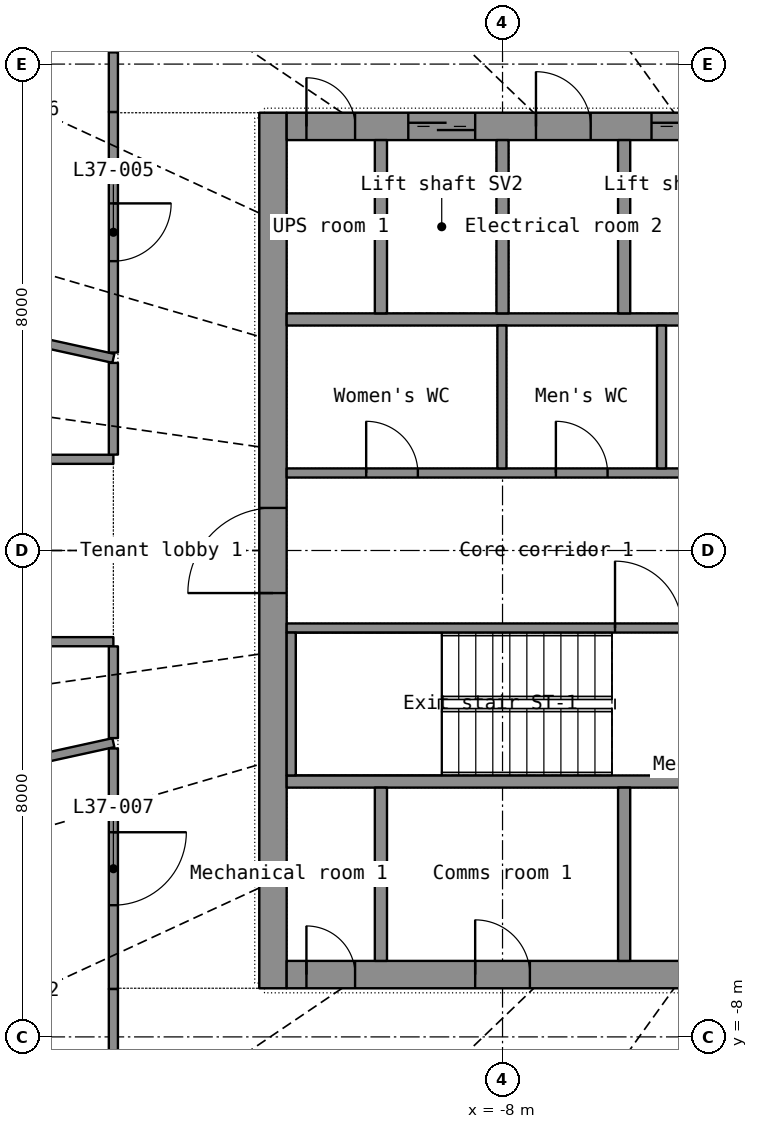
"""IFC4 building model, lengths in metres.
Left out: names, types, materials, properties, quantities, classifications, styles, units other than length and angle.
Written with IfcOpenShell. Run it as: python <this file> out.ifc"""

import sys

from ifc_helpers import new_model, si_unit, direction, frame, frame_2d, origin, place, context, subcontext, project, spatial, rectangle, extrude, element, fill, save


model = new_model("IFC4")
c1 = context("Model", 3, precision=1e-05, world=origin(), true_north=direction((0.0, 1.0)))
c2 = subcontext(c1, "Body", "Model", "MODEL_VIEW")
j1 = project(units=[si_unit("LENGTHUNIT", "METRE"), si_unit("PLANEANGLEUNIT", "RADIAN")], contexts=[c1])
p1 = place(None, origin())
s1 = spatial("IfcSite", under=j1, at=p1, CompositionType="ELEMENT")
p2 = place(p1, origin())
s2 = spatial("IfcBuilding", under=s1, at=p2, CompositionType="ELEMENT")
p3 = place(p2, frame((0.0, 0.0, 157.1)))
s3 = spatial("IfcBuildingStorey", under=s2, at=p3, CompositionType="ELEMENT", Elevation=157.1)
p4 = place(p3, frame((-11.775, -7.2, 0.0), z_axis=(0.0, 0.0, 1.0), x_axis=(0.0, 1.0, 0.0)))
e1 = element("IfcWall", 1, at=p4, inside=s3, PredefinedType="SHEAR", context=c2, shape_type="SweptSolid", body=[
    extrude(rectangle(XDim=14.4, YDim=0.45, at=frame_2d((7.2, 0.0))), origin(), (0.0, 0.0, 1.0), 3.3),
])
p5 = place(p4, frame((6.5, 0.0, 0.0)))
e2 = element("IfcOpeningElement", 2, at=p5, cuts=e1, PredefinedType="OPENING", context=c2, shape_type="SweptSolid", body=[
    extrude(rectangle(XDim=1.4, YDim=2.2, at=frame_2d((0.7, 1.1))), frame((0.0, 0.235, 0.0), z_axis=(0.0, -1.0, 0.0), x_axis=(1.0, 0.0, 0.0)), (0.0, 0.0, 1.0), 0.47),
])
p6 = place(p3, frame((-11.55, -6.975, 0.0), z_axis=(0.0, 0.0, 1.0), x_axis=(1.0, 0.0, 0.0)))
e3 = element("IfcWall", 3, at=p6, inside=s3, PredefinedType="SHEAR", context=c2, shape_type="SweptSolid", body=[
    extrude(rectangle(XDim=23.1, YDim=0.45, at=frame_2d((11.55, 0.0))), origin(), (0.0, 0.0, 1.0), 3.3),
])
p7 = place(p6, frame((20.0, 0.0, 0.0)))
e4 = element("IfcOpeningElement", 4, at=p7, cuts=e3, PredefinedType="OPENING", context=c2, shape_type="SweptSolid", body=[
    extrude(rectangle(XDim=1.1, YDim=2.2, at=frame_2d((0.55, 1.1))), frame((0.0, 0.235, 0.0), z_axis=(0.0, -1.0, 0.0), x_axis=(1.0, 0.0, 0.0)), (0.0, 0.0, 1.0), 0.47),
])
p8 = place(p6, frame((3.1, 0.0, 0.0)))
e5 = element("IfcOpeningElement", 5, at=p8, cuts=e3, PredefinedType="OPENING", context=c2, shape_type="SweptSolid", body=[
    extrude(rectangle(XDim=0.9, YDim=2.1, at=frame_2d((0.45, 1.05))), frame((0.0, 0.235, 0.0), z_axis=(0.0, -1.0, 0.0), x_axis=(1.0, 0.0, 0.0)), (0.0, 0.0, 1.0), 0.47),
])
p9 = place(p6, frame((9.1, 0.0, 0.0)))
e6 = element("IfcOpeningElement", 6, at=p9, cuts=e3, PredefinedType="OPENING", context=c2, shape_type="SweptSolid", body=[
    extrude(rectangle(XDim=0.9, YDim=2.1, at=frame_2d((0.45, 1.05))), frame((0.0, 0.235, 0.0), z_axis=(0.0, -1.0, 0.0), x_axis=(1.0, 0.0, 0.0)), (0.0, 0.0, 1.0), 0.47),
])
p10 = place(p6, frame((16.1, 0.0, 0.0)))
e7 = element("IfcOpeningElement", 7, at=p10, cuts=e3, PredefinedType="OPENING", context=c2, shape_type="SweptSolid", body=[
    extrude(rectangle(XDim=0.9, YDim=2.1, at=frame_2d((0.45, 1.05))), frame((0.0, 0.235, 0.0), z_axis=(0.0, -1.0, 0.0), x_axis=(1.0, 0.0, 0.0)), (0.0, 0.0, 1.0), 0.47),
])
p11 = place(p6, frame((0.325, 0.0, 0.0)))
e8 = element("IfcOpeningElement", 8, at=p11, cuts=e3, PredefinedType="OPENING", context=c2, shape_type="SweptSolid", body=[
    extrude(rectangle(XDim=0.8, YDim=2.05, at=frame_2d((0.4, 1.025))), frame((0.0, 0.235, 0.0), z_axis=(0.0, -1.0, 0.0), x_axis=(1.0, 0.0, 0.0)), (0.0, 0.0, 1.0), 0.47),
])
p12 = place(p6, frame((21.975, 0.0, 0.0)))
e9 = element("IfcOpeningElement", 9, at=p12, cuts=e3, PredefinedType="OPENING", context=c2, shape_type="SweptSolid", body=[
    extrude(rectangle(XDim=0.8, YDim=2.05, at=frame_2d((0.4, 1.025))), frame((0.0, 0.235, 0.0), z_axis=(0.0, -1.0, 0.0), x_axis=(1.0, 0.0, 0.0)), (0.0, 0.0, 1.0), 0.47),
])
p13 = place(p3, frame((-11.55, 6.975, 0.0), z_axis=(0.0, 0.0, 1.0), x_axis=(1.0, 0.0, 0.0)))
e10 = element("IfcWall", 10, at=p13, inside=s3, PredefinedType="SHEAR", context=c2, shape_type="SweptSolid", body=[
    extrude(rectangle(XDim=23.1, YDim=0.45, at=frame_2d((11.55, 0.0))), origin(), (0.0, 0.0, 1.0), 3.3),
])
p14 = place(p13, frame((2.0, 0.0, 0.0)))
e11 = element("IfcOpeningElement", 11, at=p14, cuts=e10, PredefinedType="OPENING", context=c2, shape_type="SweptSolid", body=[
    extrude(rectangle(XDim=1.1, YDim=2.2, at=frame_2d((0.55, 1.1))), frame((0.0, 0.235, 0.0), z_axis=(0.0, -1.0, 0.0), x_axis=(1.0, 0.0, 0.0)), (0.0, 0.0, 1.0), 0.47),
])
p15 = place(p13, frame((6.0, 0.0, 0.0)))
e12 = element("IfcOpeningElement", 12, at=p15, cuts=e10, PredefinedType="OPENING", context=c2, shape_type="SweptSolid", body=[
    extrude(rectangle(XDim=1.1, YDim=2.2, at=frame_2d((0.55, 1.1))), frame((0.0, 0.235, 0.0), z_axis=(0.0, -1.0, 0.0), x_axis=(1.0, 0.0, 0.0)), (0.0, 0.0, 1.0), 0.47),
])
p16 = place(p13, frame((8.0, 0.0, 0.0)))
e13 = element("IfcOpeningElement", 13, at=p16, cuts=e10, PredefinedType="OPENING", context=c2, shape_type="SweptSolid", body=[
    extrude(rectangle(XDim=1.1, YDim=2.2, at=frame_2d((0.55, 1.1))), frame((0.0, 0.235, 0.0), z_axis=(0.0, -1.0, 0.0), x_axis=(1.0, 0.0, 0.0)), (0.0, 0.0, 1.0), 0.47),
])
p17 = place(p13, frame((10.0, 0.0, 0.0)))
e14 = element("IfcOpeningElement", 14, at=p17, cuts=e10, PredefinedType="OPENING", context=c2, shape_type="SweptSolid", body=[
    extrude(rectangle(XDim=1.1, YDim=2.2, at=frame_2d((0.55, 1.1))), frame((0.0, 0.235, 0.0), z_axis=(0.0, -1.0, 0.0), x_axis=(1.0, 0.0, 0.0)), (0.0, 0.0, 1.0), 0.47),
])
p18 = place(p13, frame((12.0, 0.0, 0.0)))
e15 = element("IfcOpeningElement", 15, at=p18, cuts=e10, PredefinedType="OPENING", context=c2, shape_type="SweptSolid", body=[
    extrude(rectangle(XDim=1.1, YDim=2.2, at=frame_2d((0.55, 1.1))), frame((0.0, 0.235, 0.0), z_axis=(0.0, -1.0, 0.0), x_axis=(1.0, 0.0, 0.0)), (0.0, 0.0, 1.0), 0.47),
])
p19 = place(p13, frame((14.0, 0.0, 0.0)))
e16 = element("IfcOpeningElement", 16, at=p19, cuts=e10, PredefinedType="OPENING", context=c2, shape_type="SweptSolid", body=[
    extrude(rectangle(XDim=1.1, YDim=2.2, at=frame_2d((0.55, 1.1))), frame((0.0, 0.235, 0.0), z_axis=(0.0, -1.0, 0.0), x_axis=(1.0, 0.0, 0.0)), (0.0, 0.0, 1.0), 0.47),
])
p20 = place(p13, frame((16.0, 0.0, 0.0)))
e17 = element("IfcOpeningElement", 17, at=p20, cuts=e10, PredefinedType="OPENING", context=c2, shape_type="SweptSolid", body=[
    extrude(rectangle(XDim=1.1, YDim=2.2, at=frame_2d((0.55, 1.1))), frame((0.0, 0.235, 0.0), z_axis=(0.0, -1.0, 0.0), x_axis=(1.0, 0.0, 0.0)), (0.0, 0.0, 1.0), 0.47),
])
p21 = place(p13, frame((18.0, 0.0, 0.0)))
e18 = element("IfcOpeningElement", 18, at=p21, cuts=e10, PredefinedType="OPENING", context=c2, shape_type="SweptSolid", body=[
    extrude(rectangle(XDim=1.1, YDim=2.2, at=frame_2d((0.55, 1.1))), frame((0.0, 0.235, 0.0), z_axis=(0.0, -1.0, 0.0), x_axis=(1.0, 0.0, 0.0)), (0.0, 0.0, 1.0), 0.47),
])
p22 = place(p13, frame((20.0, 0.0, 0.0)))
e19 = element("IfcOpeningElement", 19, at=p22, cuts=e10, PredefinedType="OPENING", context=c2, shape_type="SweptSolid", body=[
    extrude(rectangle(XDim=1.1, YDim=2.2, at=frame_2d((0.55, 1.1))), frame((0.0, 0.235, 0.0), z_axis=(0.0, -1.0, 0.0), x_axis=(1.0, 0.0, 0.0)), (0.0, 0.0, 1.0), 0.47),
])
p23 = place(p13, frame((4.1, 0.0, 0.0)))
e20 = element("IfcOpeningElement", 20, at=p23, cuts=e10, PredefinedType="OPENING", context=c2, shape_type="SweptSolid", body=[
    extrude(rectangle(XDim=0.9, YDim=2.1, at=frame_2d((0.45, 1.05))), frame((0.0, 0.235, 0.0), z_axis=(0.0, -1.0, 0.0), x_axis=(1.0, 0.0, 0.0)), (0.0, 0.0, 1.0), 0.47),
])
p24 = place(p13, frame((0.325, 0.0, 0.0)))
e21 = element("IfcOpeningElement", 21, at=p24, cuts=e10, PredefinedType="OPENING", context=c2, shape_type="SweptSolid", body=[
    extrude(rectangle(XDim=0.8, YDim=2.05, at=frame_2d((0.4, 1.025))), frame((0.0, 0.235, 0.0), z_axis=(0.0, -1.0, 0.0), x_axis=(1.0, 0.0, 0.0)), (0.0, 0.0, 1.0), 0.47),
])
p25 = place(p13, frame((21.975, 0.0, 0.0)))
e22 = element("IfcOpeningElement", 22, at=p25, cuts=e10, PredefinedType="OPENING", context=c2, shape_type="SweptSolid", body=[
    extrude(rectangle(XDim=0.8, YDim=2.05, at=frame_2d((0.4, 1.025))), frame((0.0, 0.235, 0.0), z_axis=(0.0, -1.0, 0.0), x_axis=(1.0, 0.0, 0.0)), (0.0, 0.0, 1.0), 0.47),
])
for number, where, z_axis, x_axis in (
    (23, (-11.55, -3.8, 0.0), (0.0, 0.0, 1.0), (1.0, 0.0, 0.0)),
    (24, (-11.55, 3.8, 0.0), (0.0, 0.0, 1.0), (1.0, 0.0, 0.0)),
):
    element("IfcWall", number, at=place(p3, frame(where, z_axis=z_axis, x_axis=x_axis)), inside=s3, PredefinedType="SHEAR", context=c2, shape_type="SweptSolid", body=[
        extrude(rectangle(XDim=23.1, YDim=0.2, at=frame_2d((11.55, 0.0))), origin(), (0.0, 0.0, 1.0), 3.3),
    ])
p26 = place(p3, frame((-10.0, -6.75, 0.0), z_axis=(0.0, 0.0, 1.0), x_axis=(0.0, 1.0, 0.0)))
e25 = element("IfcWall", 25, at=p26, inside=s3, PredefinedType="SHEAR", context=c2, shape_type="SweptSolid", body=[
    extrude(rectangle(XDim=2.85, YDim=0.2, at=frame_2d((1.425, 0.0))), origin(), (0.0, 0.0, 1.0), 3.3),
])
p27 = place(p3, frame((-6.0, -6.75, 0.0), z_axis=(0.0, 0.0, 1.0), x_axis=(0.0, 1.0, 0.0)))
e26 = element("IfcWall", 26, at=p27, inside=s3, PredefinedType="PARTITIONING", context=c2, shape_type="SweptSolid", body=[
    extrude(rectangle(XDim=2.85, YDim=0.2, at=frame_2d((1.425, 0.0))), origin(), (0.0, 0.0, 1.0), 3.3),
])
for number, where, z_axis, x_axis in (
    (27, (-10.0, 3.9, 0.0), (0.0, 0.0, 1.0), (0.0, 1.0, 0.0)),
    (28, (-8.0, 3.9, 0.0), (0.0, 0.0, 1.0), (0.0, 1.0, 0.0)),
    (29, (-6.0, 3.9, 0.0), (0.0, 0.0, 1.0), (0.0, 1.0, 0.0)),
):
    element("IfcWall", number, at=place(p3, frame(where, z_axis=z_axis, x_axis=x_axis)), inside=s3, PredefinedType="SHEAR", context=c2, shape_type="SweptSolid", body=[
        extrude(rectangle(XDim=2.85, YDim=0.2, at=frame_2d((1.425, 0.0))), origin(), (0.0, 0.0, 1.0), 3.3),
    ])
p28 = place(p3, frame((-11.55, -1.275, 0.0), z_axis=(0.0, 0.0, 1.0), x_axis=(1.0, 0.0, 0.0)))
e30 = element("IfcWall", 30, at=p28, inside=s3, PredefinedType="SHEAR", context=c2, shape_type="SweptSolid", body=[
    extrude(rectangle(XDim=8.55, YDim=0.15, at=frame_2d((4.275, 0.0))), origin(), (0.0, 0.0, 1.0), 3.3),
])
p29 = place(p28, frame((5.4, 0.0, 0.0)))
e31 = element("IfcOpeningElement", 31, at=p29, cuts=e30, PredefinedType="OPENING", context=c2, shape_type="SweptSolid", body=[
    extrude(rectangle(XDim=1.1, YDim=2.15, at=frame_2d((0.55, 1.075))), frame((0.0, 0.085, 0.0), z_axis=(0.0, -1.0, 0.0), x_axis=(1.0, 0.0, 0.0)), (0.0, 0.0, 1.0), 0.17),
])
p30 = place(p28, frame((7.2, 0.0, 0.0)))
e32 = element("IfcOpeningElement", 32, at=p30, cuts=e30, PredefinedType="OPENING", context=c2, shape_type="SweptSolid", body=[
    extrude(rectangle(XDim=0.9, YDim=2.1, at=frame_2d((0.45, 1.05))), frame((0.0, 0.085, 0.0), z_axis=(0.0, -1.0, 0.0), x_axis=(1.0, 0.0, 0.0)), (0.0, 0.0, 1.0), 0.17),
])
p31 = place(p3, frame((-11.55, 1.275, 0.0), z_axis=(0.0, 0.0, 1.0), x_axis=(1.0, 0.0, 0.0)))
e33 = element("IfcWall", 33, at=p31, inside=s3, PredefinedType="PARTITIONING", context=c2, shape_type="SweptSolid", body=[
    extrude(rectangle(XDim=8.55, YDim=0.15, at=frame_2d((4.275, 0.0))), origin(), (0.0, 0.0, 1.0), 3.3),
])
p32 = place(p31, frame((1.308, 0.0, 0.0)))
e34 = element("IfcOpeningElement", 34, at=p32, cuts=e33, PredefinedType="OPENING", context=c2, shape_type="SweptSolid", body=[
    extrude(rectangle(XDim=0.85, YDim=2.1, at=frame_2d((0.425, 1.05))), frame((0.0, 0.085, 0.0), z_axis=(0.0, -1.0, 0.0), x_axis=(1.0, 0.0, 0.0)), (0.0, 0.0, 1.0), 0.17),
])
p33 = place(p31, frame((4.427, 0.0, 0.0)))
e35 = element("IfcOpeningElement", 35, at=p33, cuts=e33, PredefinedType="OPENING", context=c2, shape_type="SweptSolid", body=[
    extrude(rectangle(XDim=0.85, YDim=2.1, at=frame_2d((0.425, 1.05))), frame((0.0, 0.085, 0.0), z_axis=(0.0, -1.0, 0.0), x_axis=(1.0, 0.0, 0.0)), (0.0, 0.0, 1.0), 0.17),
])
p34 = place(p31, frame((6.945, 0.0, 0.0)))
e36 = element("IfcOpeningElement", 36, at=p34, cuts=e33, PredefinedType="OPENING", context=c2, shape_type="SweptSolid", body=[
    extrude(rectangle(XDim=0.9, YDim=2.1, at=frame_2d((0.45, 1.05))), frame((0.0, 0.085, 0.0), z_axis=(0.0, -1.0, 0.0), x_axis=(1.0, 0.0, 0.0)), (0.0, 0.0, 1.0), 0.17),
])
p35 = place(p3, frame((-11.475, -3.7, 0.0), z_axis=(0.0, 0.0, 1.0), x_axis=(0.0, 1.0, 0.0)))
e37 = element("IfcWall", 37, at=p35, inside=s3, PredefinedType="SHEAR", context=c2, shape_type="SweptSolid", body=[
    extrude(rectangle(XDim=2.35, YDim=0.15, at=frame_2d((1.175, 0.0))), origin(), (0.0, 0.0, 1.0), 3.3),
])
for number, where, z_axis, x_axis in (
    (38, (-8.01, 1.35, 0.0), (0.0, 0.0, 1.0), (0.0, 1.0, 0.0)),
    (39, (-5.385, 1.35, 0.0), (0.0, 0.0, 1.0), (0.0, 1.0, 0.0)),
):
    element("IfcWall", number, at=place(p3, frame(where, z_axis=z_axis, x_axis=x_axis)), inside=s3, PredefinedType="PARTITIONING", context=c2, shape_type="SweptSolid", body=[
        extrude(rectangle(XDim=2.35, YDim=0.15, at=frame_2d((1.175, 0.0))), origin(), (0.0, 0.0, 1.0), 3.3),
    ])
p36 = place(p3, frame((-22.981, 5.044, 0.0), z_axis=(0.0, 0.0, 1.0), x_axis=(0.976745479, -0.214402122, 0.0)))
e40 = element("IfcWall", 40, at=p36, inside=s3, PredefinedType="PARTITIONING", context=c2, shape_type="SweptSolid", body=[
    extrude(rectangle(XDim=8.785, YDim=0.15, at=frame_2d((4.393, 0.0))), origin(), (0.0, 0.0, 1.0), 2.4),
])
p37 = place(p3, frame((-22.979, -5.044, 0.0), z_axis=(0.0, 0.0, 1.0), x_axis=(0.976744911, 0.214404708, 0.0)))
e41 = element("IfcWall", 41, at=p37, inside=s3, PredefinedType="PARTITIONING", context=c2, shape_type="SweptSolid", body=[
    extrude(rectangle(XDim=8.784, YDim=0.15, at=frame_2d((4.392, 0.0))), origin(), (0.0, 0.0, 1.0), 2.4),
])
p38 = place(p3, frame((-21.202, -1.5, 0.0), z_axis=(0.0, 0.0, 1.0), x_axis=(1.0, 0.0, 0.0)))
e42 = element("IfcWall", 42, at=p38, inside=s3, PredefinedType="PARTITIONING", context=c2, shape_type="SweptSolid", body=[
    extrude(rectangle(XDim=6.802, YDim=0.15, at=frame_2d((3.401, 0.0))), origin(), (0.0, 0.0, 1.0), 2.4),
])
p39 = place(p38, frame((2.801, 0.0, 0.0)))
e43 = element("IfcOpeningElement", 43, at=p39, cuts=e42, PredefinedType="OPENING", context=c2, shape_type="SweptSolid", body=[
    extrude(rectangle(XDim=1.2, YDim=2.2, at=frame_2d((0.6, 1.1))), frame((0.0, 0.085, 0.0), z_axis=(0.0, -1.0, 0.0), x_axis=(1.0, 0.0, 0.0)), (0.0, 0.0, 1.0), 0.17),
])
p40 = place(p3, frame((-14.4, 1.5, 0.0), z_axis=(0.0, 0.0, 1.0), x_axis=(-1.0, 0.0, 0.0)))
e44 = element("IfcWall", 44, at=p40, inside=s3, PredefinedType="PARTITIONING", context=c2, shape_type="SweptSolid", body=[
    extrude(rectangle(XDim=6.802, YDim=0.15, at=frame_2d((3.401, 0.0))), origin(), (0.0, 0.0, 1.0), 2.4),
])
p41 = place(p3, frame((-19.483, 11.175, 0.0), z_axis=(0.0, 0.0, 1.0), x_axis=(0.867447243, -0.497529176, 0.0)))
e45 = element("IfcWall", 45, at=p41, inside=s3, PredefinedType="PARTITIONING", context=c2, shape_type="SweptSolid", body=[
    extrude(rectangle(XDim=5.86, YDim=0.15, at=frame_2d((2.93, 0.0))), origin(), (0.0, 0.0, 1.0), 2.4),
])
p42 = place(p3, frame((-14.4, -3.256, 0.0), z_axis=(0.0, 0.0, 1.0), x_axis=(0.0, -1.0, 0.0)))
e46 = element("IfcWall", 46, at=p42, inside=s3, PredefinedType="PARTITIONING", context=c2, shape_type="SweptSolid", body=[
    extrude(rectangle(XDim=3.956, YDim=0.15, at=frame_2d((1.978, 0.0))), origin(), (0.0, 0.0, 1.0), 2.4),
])
p43 = place(p42, frame((1.378, 0.0, 0.0)))
e47 = element("IfcOpeningElement", 47, at=p43, cuts=e46, PredefinedType="OPENING", context=c2, shape_type="SweptSolid", body=[
    extrude(rectangle(XDim=1.2, YDim=2.2, at=frame_2d((0.6, 1.1))), frame((0.0, 0.085, 0.0), z_axis=(0.0, -1.0, 0.0), x_axis=(1.0, 0.0, 0.0)), (0.0, 0.0, 1.0), 0.17),
])
p44 = place(p3, frame((-14.4, 7.212, 0.0), z_axis=(0.0, 0.0, 1.0), x_axis=(0.0, -1.0, 0.0)))
e48 = element("IfcWall", 48, at=p44, inside=s3, PredefinedType="PARTITIONING", context=c2, shape_type="SweptSolid", body=[
    extrude(rectangle(XDim=3.956, YDim=0.15, at=frame_2d((1.978, 0.0))), origin(), (0.0, 0.0, 1.0), 2.4),
])
p45 = place(p44, frame((1.503, 0.0, 0.0)))
e49 = element("IfcOpeningElement", 49, at=p45, cuts=e48, PredefinedType="OPENING", context=c2, shape_type="SweptSolid", body=[
    extrude(rectangle(XDim=0.95, YDim=2.15, at=frame_2d((0.475, 1.075))), frame((0.0, 0.085, 0.0), z_axis=(0.0, -1.0, 0.0), x_axis=(1.0, 0.0, 0.0)), (0.0, 0.0, 1.0), 0.17),
])
p46 = place(p3, frame((-14.4, -7.213, 0.0), z_axis=(0.0, 0.0, 1.0), x_axis=(0.0, -1.0, 0.0)))
e50 = element("IfcWall", 50, at=p46, inside=s3, PredefinedType="PARTITIONING", context=c2, shape_type="SweptSolid", body=[
    extrude(rectangle(XDim=2.31, YDim=0.15, at=frame_2d((1.155, 0.0))), origin(), (0.0, 0.0, 1.0), 2.4),
])
for number, where, z_axis, x_axis in (
    (51, (-14.4, -1.577, 0.0), (0.0, 0.0, 1.0), (0.0, -1.0, 0.0)),
    (52, (-14.4, 3.085, 0.0), (0.0, 0.0, 1.0), (0.0, -1.0, 0.0)),
):
    element("IfcWall", number, at=place(p3, frame(where, z_axis=z_axis, x_axis=x_axis)), inside=s3, PredefinedType="PARTITIONING", context=c2, shape_type="SweptSolid", body=[
        extrude(rectangle(XDim=1.508, YDim=0.15, at=frame_2d((0.754, 0.0))), origin(), (0.0, 0.0, 1.0), 2.4),
    ])
p47 = place(p3, frame((-14.4, 8.192, 0.0), z_axis=(0.0, 0.0, 1.0), x_axis=(0.0, -1.0, 0.0)))
e53 = element("IfcWall", 53, at=p47, inside=s3, PredefinedType="PARTITIONING", context=c2, shape_type="SweptSolid", body=[
    extrude(rectangle(XDim=0.979, YDim=0.15, at=frame_2d((0.49, 0.0))), origin(), (0.0, 0.0, 1.0), 2.4),
])
p48 = place(p8, origin())
e54 = element("IfcDoor", 54, at=p48, inside=s3, OperationType="SINGLE_SWING_LEFT", PredefinedType="DOOR", context=c2, shape_type="SweptSolid", body=[
    extrude(rectangle(XDim=0.9, YDim=2.1, at=frame_2d((0.45, 1.05))), frame((0.0, 0.025, 0.0), z_axis=(0.0, -1.0, 0.0), x_axis=(1.0, 0.0, 0.0)), (0.0, 0.0, 1.0), 0.05),
])
fill(e5, e54)
p49 = place(p11, origin())
e55 = element("IfcDoor", 55, at=p49, inside=s3, OperationType="SINGLE_SWING_LEFT", PredefinedType="DOOR", context=c2, shape_type="SweptSolid", body=[
    extrude(rectangle(XDim=0.8, YDim=2.05, at=frame_2d((0.4, 1.025))), frame((0.0, 0.025, 0.0), z_axis=(0.0, -1.0, 0.0), x_axis=(1.0, 0.0, 0.0)), (0.0, 0.0, 1.0), 0.05),
])
fill(e8, e55)
p50 = place(p14, origin())
e56 = element("IfcDoor", 56, at=p50, inside=s3, OperationType="DOUBLE_DOOR_SLIDING", PredefinedType="DOOR", context=c2, shape_type="SweptSolid", body=[
    extrude(rectangle(XDim=1.1, YDim=2.2, at=frame_2d((0.55, 1.1))), frame((0.0, 0.025, 0.0), z_axis=(0.0, -1.0, 0.0), x_axis=(1.0, 0.0, 0.0)), (0.0, 0.0, 1.0), 0.05),
])
fill(e11, e56)
p51 = place(p15, origin())
e57 = element("IfcDoor", 57, at=p51, inside=s3, OperationType="DOUBLE_DOOR_SLIDING", PredefinedType="DOOR", context=c2, shape_type="SweptSolid", body=[
    extrude(rectangle(XDim=1.1, YDim=2.2, at=frame_2d((0.55, 1.1))), frame((0.0, 0.025, 0.0), z_axis=(0.0, -1.0, 0.0), x_axis=(1.0, 0.0, 0.0)), (0.0, 0.0, 1.0), 0.05),
])
fill(e12, e57)
p52 = place(p23, origin())
e58 = element("IfcDoor", 58, at=p52, inside=s3, OperationType="SINGLE_SWING_LEFT", PredefinedType="DOOR", context=c2, shape_type="SweptSolid", body=[
    extrude(rectangle(XDim=0.9, YDim=2.1, at=frame_2d((0.45, 1.05))), frame((0.0, 0.025, 0.0), z_axis=(0.0, -1.0, 0.0), x_axis=(1.0, 0.0, 0.0)), (0.0, 0.0, 1.0), 0.05),
])
fill(e20, e58)
p53 = place(p24, origin())
e59 = element("IfcDoor", 59, at=p53, inside=s3, OperationType="SINGLE_SWING_LEFT", PredefinedType="DOOR", context=c2, shape_type="SweptSolid", body=[
    extrude(rectangle(XDim=0.8, YDim=2.05, at=frame_2d((0.4, 1.025))), frame((0.0, 0.025, 0.0), z_axis=(0.0, -1.0, 0.0), x_axis=(1.0, 0.0, 0.0)), (0.0, 0.0, 1.0), 0.05),
])
fill(e21, e59)
p54 = place(p5, origin())
e60 = element("IfcDoor", 60, at=p54, inside=s3, OperationType="DOUBLE_DOOR_SINGLE_SWING", PredefinedType="DOOR", context=c2, shape_type="SweptSolid", body=[
    extrude(rectangle(XDim=1.4, YDim=2.2, at=frame_2d((0.7, 1.1))), frame((0.0, 0.025, 0.0), z_axis=(0.0, -1.0, 0.0), x_axis=(1.0, 0.0, 0.0)), (0.0, 0.0, 1.0), 0.05),
])
fill(e2, e60)
p55 = place(p29, origin())
e61 = element("IfcDoor", 61, at=p55, inside=s3, OperationType="SINGLE_SWING_LEFT", PredefinedType="DOOR", context=c2, shape_type="SweptSolid", body=[
    extrude(rectangle(XDim=1.1, YDim=2.15, at=frame_2d((0.55, 1.075))), frame((0.0, 0.025, 0.0), z_axis=(0.0, -1.0, 0.0), x_axis=(1.0, 0.0, 0.0)), (0.0, 0.0, 1.0), 0.05),
])
fill(e31, e61)
p56 = place(p32, origin())
e62 = element("IfcDoor", 62, at=p56, inside=s3, OperationType="SINGLE_SWING_LEFT", PredefinedType="DOOR", context=c2, shape_type="SweptSolid", body=[
    extrude(rectangle(XDim=0.85, YDim=2.1, at=frame_2d((0.425, 1.05))), frame((0.0, 0.025, 0.0), z_axis=(0.0, -1.0, 0.0), x_axis=(1.0, 0.0, 0.0)), (0.0, 0.0, 1.0), 0.05),
])
fill(e34, e62)
p57 = place(p33, origin())
e63 = element("IfcDoor", 63, at=p57, inside=s3, OperationType="SINGLE_SWING_LEFT", PredefinedType="DOOR", context=c2, shape_type="SweptSolid", body=[
    extrude(rectangle(XDim=0.85, YDim=2.1, at=frame_2d((0.425, 1.05))), frame((0.0, 0.025, 0.0), z_axis=(0.0, -1.0, 0.0), x_axis=(1.0, 0.0, 0.0)), (0.0, 0.0, 1.0), 0.05),
])
fill(e35, e63)
p58 = place(p45, origin())
e64 = element("IfcDoor", 64, at=p58, inside=s3, OperationType="SINGLE_SWING_LEFT", PredefinedType="DOOR", context=c2, shape_type="SweptSolid", body=[
    extrude(rectangle(XDim=0.95, YDim=2.15, at=frame_2d((0.475, 1.075))), frame((0.0, 0.025, 0.0), z_axis=(0.0, -1.0, 0.0), x_axis=(1.0, 0.0, 0.0)), (0.0, 0.0, 1.0), 0.05),
])
fill(e49, e64)
p59 = place(p43, origin())
e65 = element("IfcDoor", 65, at=p59, inside=s3, OperationType="DOUBLE_DOOR_SINGLE_SWING", PredefinedType="DOOR", context=c2, shape_type="SweptSolid", body=[
    extrude(rectangle(XDim=1.2, YDim=2.2, at=frame_2d((0.6, 1.1))), frame((0.0, 0.025, 0.0), z_axis=(0.0, -1.0, 0.0), x_axis=(1.0, 0.0, 0.0)), (0.0, 0.0, 1.0), 0.05),
])
fill(e47, e65)
save(model, sys.argv[1])
